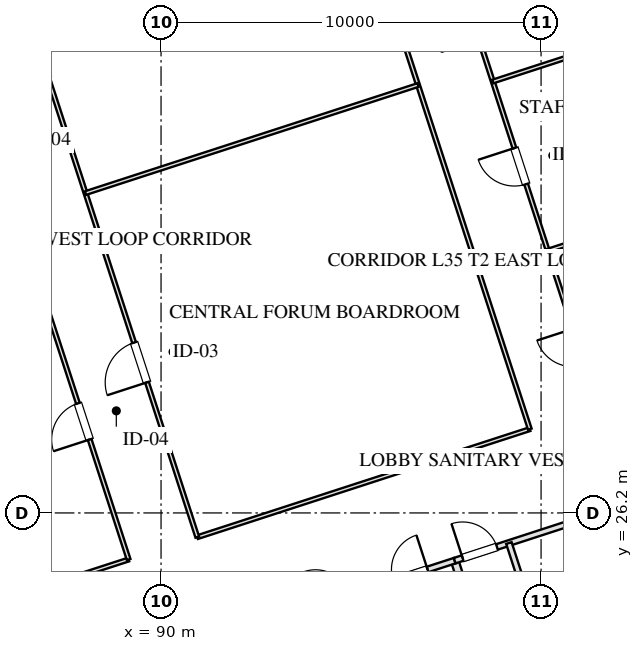
"""IFC4 building model, lengths in metres.
Left out: names, types, materials, properties, quantities, classifications, styles, units other than length and angle.
Written with IfcOpenShell. Run it as: python <this file> out.ifc"""

import sys

from ifc_helpers import new_model, si_unit, direction, frame, frame_2d, origin, place, context, subcontext, project, spatial, rectangle, extrude, element, fill, save


model = new_model("IFC4")
c1 = context("Model", 3, precision=1e-05, world=origin(), true_north=direction((0.0, 1.0)))
c2 = subcontext(c1, "Body", "Model", "MODEL_VIEW")
j1 = project(units=[si_unit("LENGTHUNIT", "METRE"), si_unit("PLANEANGLEUNIT", "RADIAN")], contexts=[c1])
p1 = place(None, origin())
s1 = spatial("IfcSite", under=j1, at=p1, CompositionType="ELEMENT")
p2 = place(p1, origin())
s2 = spatial("IfcBuilding", under=s1, at=p2, CompositionType="ELEMENT")
p3 = place(p2, frame((0.0, 0.0, 134.55)))
s3 = spatial("IfcBuildingStorey", under=s2, at=p3, CompositionType="ELEMENT", Elevation=134.55)
p4 = place(p3, frame((98.224, 59.173, 0.0), z_axis=(0.0, 0.0, 1.0), x_axis=(0.309014228706, -0.951057414911, 0.0)))
e1 = element("IfcWall", 1, at=p4, inside=s3, PredefinedType="SOLIDWALL", context=c2, shape_type="SweptSolid", body=[
    extrude(rectangle(XDim=42.8, YDim=0.4, at=frame_2d((21.4, 0.0))), origin(), (0.0, 0.0, 1.0), 2.55),
])
p5 = place(p4, frame((18.25, 0.0, 0.0)))
e2 = element("IfcOpeningElement", 2, at=p5, cuts=e1, PredefinedType="OPENING", context=c2, shape_type="SweptSolid", body=[
    extrude(rectangle(XDim=1.1, YDim=2.15, at=frame_2d((0.55, 1.075))), frame((0.0, 0.21, 0.0), z_axis=(0.0, -1.0, 0.0), x_axis=(1.0, 0.0, 0.0)), (0.0, 0.0, 1.0), 0.42),
])
p6 = place(p3, frame((97.727, 24.944, 0.0), z_axis=(0.0, 0.0, 1.0), x_axis=(0.309016001439, -0.951056838919, 0.0)))
e3 = element("IfcWall", 3, at=p6, inside=s3, PredefinedType="PARTITIONING", context=c2, shape_type="SweptSolid", body=[
    extrude(rectangle(XDim=8.43, YDim=0.2, at=frame_2d((4.215, 0.0))), origin(), (0.0, 0.0, 1.0), 3.155),
])
p7 = place(p3, frame((93.542, 23.585, 0.0), z_axis=(0.0, 0.0, 1.0), x_axis=(0.951063829732, 0.308994485023, 0.0)))
e4 = element("IfcWall", 4, at=p7, inside=s3, PredefinedType="PARTITIONING", context=c2, shape_type="SweptSolid", body=[
    extrude(rectangle(XDim=4.4, YDim=0.15, at=frame_2d((2.2, 0.0))), origin(), (0.0, 0.0, 1.0), 3.155),
])
p8 = place(p7, frame((0.55, 0.0, 0.0)))
e5 = element("IfcOpeningElement", 5, at=p8, cuts=e4, PredefinedType="OPENING", context=c2, shape_type="SweptSolid", body=[
    extrude(rectangle(XDim=0.95, YDim=2.05, at=frame_2d((0.475, 1.025))), frame((0.0, 0.085, 0.0), z_axis=(0.0, -1.0, 0.0), x_axis=(1.0, 0.0, 0.0)), (0.0, 0.0, 1.0), 0.17),
])
p9 = place(p7, frame((2.7, 0.0, 0.0)))
e6 = element("IfcOpeningElement", 6, at=p9, cuts=e4, PredefinedType="OPENING", context=c2, shape_type="SweptSolid", body=[
    extrude(rectangle(XDim=0.95, YDim=2.05, at=frame_2d((0.475, 1.025))), frame((0.0, 0.085, 0.0), z_axis=(0.0, -1.0, 0.0), x_axis=(1.0, 0.0, 0.0)), (0.0, 0.0, 1.0), 0.17),
])
p10 = place(p3, frame((97.727, 24.944, 0.0), z_axis=(0.0, 0.0, 1.0), x_axis=(0.951036872128, 0.309077446369, 0.0)))
e7 = element("IfcWall", 7, at=p10, inside=s3, PredefinedType="PARTITIONING", context=c2, shape_type="SweptSolid", body=[
    extrude(rectangle(XDim=3.2, YDim=0.15, at=frame_2d((1.6, 0.0))), origin(), (0.0, 0.0, 1.0), 3.155),
])
p11 = place(p10, frame((0.22, 0.0, 0.0)))
e8 = element("IfcOpeningElement", 8, at=p11, cuts=e7, PredefinedType="OPENING", context=c2, shape_type="SweptSolid", body=[
    extrude(rectangle(XDim=0.95, YDim=2.05, at=frame_2d((0.475, 1.025))), frame((0.0, 0.085, 0.0), z_axis=(0.0, -1.0, 0.0), x_axis=(1.0, 0.0, 0.0)), (0.0, 0.0, 1.0), 0.17),
])
p12 = place(p3, frame((99.153, 25.408, 0.0), z_axis=(0.0, 0.0, 1.0), x_axis=(0.309016001439, -0.951056838919, 0.0)))
e9 = element("IfcWall", 9, at=p12, inside=s3, PredefinedType="PARTITIONING", context=c2, shape_type="SweptSolid", body=[
    extrude(rectangle(XDim=8.43, YDim=0.15, at=frame_2d((4.215, 0.0))), origin(), (0.0, 0.0, 1.0), 3.155),
])
p13 = place(p12, frame((2.55, 0.0, 0.0)))
e10 = element("IfcOpeningElement", 10, at=p13, cuts=e9, PredefinedType="OPENING", context=c2, shape_type="SweptSolid", body=[
    extrude(rectangle(XDim=0.95, YDim=2.05, at=frame_2d((0.475, 1.025))), frame((0.0, 0.085, 0.0), z_axis=(0.0, -1.0, 0.0), x_axis=(1.0, 0.0, 0.0)), (0.0, 0.0, 1.0), 0.17),
])
p14 = place(p12, frame((4.7, 0.0, 0.0)))
e11 = element("IfcOpeningElement", 11, at=p14, cuts=e9, PredefinedType="OPENING", context=c2, shape_type="SweptSolid", body=[
    extrude(rectangle(XDim=0.9, YDim=2.05, at=frame_2d((0.45, 1.025))), frame((0.0, 0.085, 0.0), z_axis=(0.0, -1.0, 0.0), x_axis=(1.0, 0.0, 0.0)), (0.0, 0.0, 1.0), 0.17),
])
p15 = place(p12, frame((6.8, 0.0, 0.0)))
e12 = element("IfcOpeningElement", 12, at=p15, cuts=e9, PredefinedType="OPENING", context=c2, shape_type="SweptSolid", body=[
    extrude(rectangle(XDim=0.9, YDim=2.05, at=frame_2d((0.45, 1.025))), frame((0.0, 0.085, 0.0), z_axis=(0.0, -1.0, 0.0), x_axis=(1.0, 0.0, 0.0)), (0.0, 0.0, 1.0), 0.17),
])
p16 = place(p3, frame((77.925, 21.328, 0.0), z_axis=(0.0, 0.0, 1.0), x_axis=(0.951053984761, 0.309024785528, 0.0)))
e13 = element("IfcWall", 13, at=p16, inside=s3, PredefinedType="MOVABLE", context=c2, shape_type="SweptSolid", body=[
    extrude(rectangle(XDim=11.8, YDim=0.1, at=frame_2d((5.9, 0.0))), origin(), (0.0, 0.0, 1.0), 3.155),
])
p17 = place(p3, frame((90.954, 25.562, 0.0), z_axis=(0.0, 0.0, 1.0), x_axis=(0.951052398814, 0.309029666393, 0.0)))
e14 = element("IfcWall", 14, at=p17, inside=s3, PredefinedType="MOVABLE", context=c2, shape_type="SweptSolid", body=[
    extrude(rectangle(XDim=9.2, YDim=0.1, at=frame_2d((4.6, 0.0))), origin(), (0.0, 0.0, 1.0), 3.155),
])
p18 = place(p3, frame((89.147, 24.975, 0.0), z_axis=(0.0, 0.0, 1.0), x_axis=(-0.309022042254, 0.951054876125, 0.0)))
e15 = element("IfcWall", 15, at=p18, inside=s3, PredefinedType="MOVABLE", context=c2, shape_type="SweptSolid", body=[
    extrude(rectangle(XDim=16.64, YDim=0.1, at=frame_2d((8.32, 0.0))), origin(), (0.0, 0.0, 1.0), 3.155),
])
p19 = place(p18, frame((3.32, 0.0, 0.0)))
e16 = element("IfcOpeningElement", 16, at=p19, cuts=e15, PredefinedType="OPENING", context=c2, shape_type="SweptSolid", body=[
    extrude(rectangle(XDim=1.0, YDim=2.05, at=frame_2d((0.5, 1.025))), frame((0.0, 0.06, 0.0), z_axis=(0.0, -1.0, 0.0), x_axis=(1.0, 0.0, 0.0)), (0.0, 0.0, 1.0), 0.12),
])
p20 = place(p18, frame((11.64, 0.0, 0.0)))
e17 = element("IfcOpeningElement", 17, at=p20, cuts=e15, PredefinedType="OPENING", context=c2, shape_type="SweptSolid", body=[
    extrude(rectangle(XDim=1.0, YDim=2.05, at=frame_2d((0.5, 1.025))), frame((0.0, 0.06, 0.0), z_axis=(0.0, -1.0, 0.0), x_axis=(1.0, 0.0, 0.0)), (0.0, 0.0, 1.0), 0.12),
])
p21 = place(p3, frame((90.954, 25.562, 0.0), z_axis=(0.0, 0.0, 1.0), x_axis=(-0.30901773025, 0.951056277195, 0.0)))
e18 = element("IfcWall", 18, at=p21, inside=s3, PredefinedType="MOVABLE", context=c2, shape_type="SweptSolid", body=[
    extrude(rectangle(XDim=16.64, YDim=0.1, at=frame_2d((8.32, 0.0))), origin(), (0.0, 0.0, 1.0), 3.155),
])
p22 = place(p21, frame((4.284, 0.0, 0.0)))
e19 = element("IfcOpeningElement", 19, at=p22, cuts=e18, PredefinedType="OPENING", context=c2, shape_type="SweptSolid", body=[
    extrude(rectangle(XDim=1.1, YDim=2.05, at=frame_2d((0.55, 1.025))), frame((0.0, 0.06, 0.0), z_axis=(0.0, -1.0, 0.0), x_axis=(1.0, 0.0, 0.0)), (0.0, 0.0, 1.0), 0.12),
])
p23 = place(p21, frame((12.724, 0.0, 0.0)))
e20 = element("IfcOpeningElement", 20, at=p23, cuts=e18, PredefinedType="OPENING", context=c2, shape_type="SweptSolid", body=[
    extrude(rectangle(XDim=1.1, YDim=2.05, at=frame_2d((0.55, 1.025))), frame((0.0, 0.06, 0.0), z_axis=(0.0, -1.0, 0.0), x_axis=(1.0, 0.0, 0.0)), (0.0, 0.0, 1.0), 0.12),
])
p24 = place(p3, frame((99.704, 28.405, 0.0), z_axis=(0.0, 0.0, 1.0), x_axis=(-0.309004459387, 0.951060589068, 0.0)))
e21 = element("IfcWall", 21, at=p24, inside=s3, PredefinedType="MOVABLE", context=c2, shape_type="SweptSolid", body=[
    extrude(rectangle(XDim=16.64, YDim=0.1, at=frame_2d((8.32, 0.0))), origin(), (0.0, 0.0, 1.0), 3.155),
])
p25 = place(p3, frame((101.511, 28.992, 0.0), z_axis=(0.0, 0.0, 1.0), x_axis=(-0.30901773025, 0.951056277195, 0.0)))
e22 = element("IfcWall", 22, at=p25, inside=s3, PredefinedType="MOVABLE", context=c2, shape_type="SweptSolid", body=[
    extrude(rectangle(XDim=16.64, YDim=0.1, at=frame_2d((8.32, 0.0))), origin(), (0.0, 0.0, 1.0), 3.155),
])
p26 = place(p25, frame((1.16, 0.0, 0.0)))
e23 = element("IfcOpeningElement", 23, at=p26, cuts=e22, PredefinedType="OPENING", context=c2, shape_type="SweptSolid", body=[
    extrude(rectangle(XDim=1.0, YDim=2.05, at=frame_2d((0.5, 1.025))), frame((0.0, 0.06, 0.0), z_axis=(0.0, -1.0, 0.0), x_axis=(1.0, 0.0, 0.0)), (0.0, 0.0, 1.0), 0.12),
])
p27 = place(p25, frame((6.16, 0.0, 0.0)))
e24 = element("IfcOpeningElement", 24, at=p27, cuts=e22, PredefinedType="OPENING", context=c2, shape_type="SweptSolid", body=[
    extrude(rectangle(XDim=1.0, YDim=2.05, at=frame_2d((0.5, 1.025))), frame((0.0, 0.06, 0.0), z_axis=(0.0, -1.0, 0.0), x_axis=(1.0, 0.0, 0.0)), (0.0, 0.0, 1.0), 0.12),
])
p28 = place(p25, frame((10.16, 0.0, 0.0)))
e25 = element("IfcOpeningElement", 25, at=p28, cuts=e22, PredefinedType="OPENING", context=c2, shape_type="SweptSolid", body=[
    extrude(rectangle(XDim=1.05, YDim=2.05, at=frame_2d((0.525, 1.025))), frame((0.0, 0.06, 0.0), z_axis=(0.0, -1.0, 0.0), x_axis=(1.0, 0.0, 0.0)), (0.0, 0.0, 1.0), 0.12),
])
p29 = place(p25, frame((14.48, 0.0, 0.0)))
e26 = element("IfcOpeningElement", 26, at=p29, cuts=e22, PredefinedType="OPENING", context=c2, shape_type="SweptSolid", body=[
    extrude(rectangle(XDim=0.85, YDim=2.05, at=frame_2d((0.425, 1.025))), frame((0.0, 0.06, 0.0), z_axis=(0.0, -1.0, 0.0), x_axis=(1.0, 0.0, 0.0)), (0.0, 0.0, 1.0), 0.12),
])
p30 = place(p3, frame((88.012, 34.616, 0.0), z_axis=(0.0, 0.0, 1.0), x_axis=(0.951054933035, 0.309021867106, 0.0)))
e27 = element("IfcWall", 27, at=p30, inside=s3, PredefinedType="MOVABLE", context=c2, shape_type="SweptSolid", body=[
    extrude(rectangle(XDim=9.2, YDim=0.1, at=frame_2d((4.6, 0.0))), origin(), (0.0, 0.0, 1.0), 3.155),
])
for number, where, z_axis, x_axis in (
    (28, (100.176, 33.101, 0.0), (0.0, 0.0, 1.0), (0.951, 0.309, 0.0)),
    (29, (98.73, 37.552, 0.0), (0.0, 0.0, 1.0), (0.951, 0.309, 0.0)),
):
    element("IfcWall", number, at=place(p3, frame(where, z_axis=z_axis, x_axis=x_axis)), inside=s3, PredefinedType="MOVABLE", context=c2, shape_type="SweptSolid", body=[
        extrude(rectangle(XDim=6.0, YDim=0.1, at=frame_2d((3.0, 0.0))), origin(), (0.0, 0.0, 1.0), 3.155),
    ])
p31 = place(p9, origin())
e30 = element("IfcDoor", 30, at=p31, inside=s3, OperationType="SINGLE_SWING_RIGHT", PredefinedType="DOOR", context=c2, shape_type="SweptSolid", body=[
    extrude(rectangle(XDim=0.95, YDim=2.05, at=frame_2d((0.475, 1.025))), frame((0.0, 0.025, 0.0), z_axis=(0.0, -1.0, 0.0), x_axis=(1.0, 0.0, 0.0)), (0.0, 0.0, 1.0), 0.05),
])
fill(e6, e30)
p32 = place(p11, origin())
e31 = element("IfcDoor", 31, at=p32, inside=s3, OperationType="SINGLE_SWING_LEFT", PredefinedType="DOOR", context=c2, shape_type="SweptSolid", body=[
    extrude(rectangle(XDim=0.95, YDim=2.05, at=frame_2d((0.475, 1.025))), frame((0.0, 0.025, 0.0), z_axis=(0.0, -1.0, 0.0), x_axis=(1.0, 0.0, 0.0)), (0.0, 0.0, 1.0), 0.05),
])
fill(e8, e31)
p33 = place(p19, origin())
e32 = element("IfcDoor", 32, at=p33, inside=s3, OperationType="SINGLE_SWING_LEFT", PredefinedType="DOOR", context=c2, shape_type="SweptSolid", body=[
    extrude(rectangle(XDim=1.0, YDim=2.05, at=frame_2d((0.5, 1.025))), frame((0.0, 0.025, 0.0), z_axis=(0.0, -1.0, 0.0), x_axis=(1.0, 0.0, 0.0)), (0.0, 0.0, 1.0), 0.05),
])
fill(e16, e32)
p34 = place(p22, origin())
e33 = element("IfcDoor", 33, at=p34, inside=s3, OperationType="SINGLE_SWING_LEFT", PredefinedType="DOOR", context=c2, shape_type="SweptSolid", body=[
    extrude(rectangle(XDim=1.1, YDim=2.05, at=frame_2d((0.55, 1.025))), frame((0.0, 0.025, 0.0), z_axis=(0.0, -1.0, 0.0), x_axis=(1.0, 0.0, 0.0)), (0.0, 0.0, 1.0), 0.05),
])
fill(e19, e33)
p35 = place(p27, origin())
e34 = element("IfcDoor", 34, at=p35, inside=s3, OperationType="SINGLE_SWING_RIGHT", PredefinedType="DOOR", context=c2, shape_type="SweptSolid", body=[
    extrude(rectangle(XDim=1.0, YDim=2.05, at=frame_2d((0.5, 1.025))), frame((0.0, 0.025, 0.0), z_axis=(0.0, -1.0, 0.0), x_axis=(1.0, 0.0, 0.0)), (0.0, 0.0, 1.0), 0.05),
])
fill(e24, e34)
save(model, sys.argv[1])
